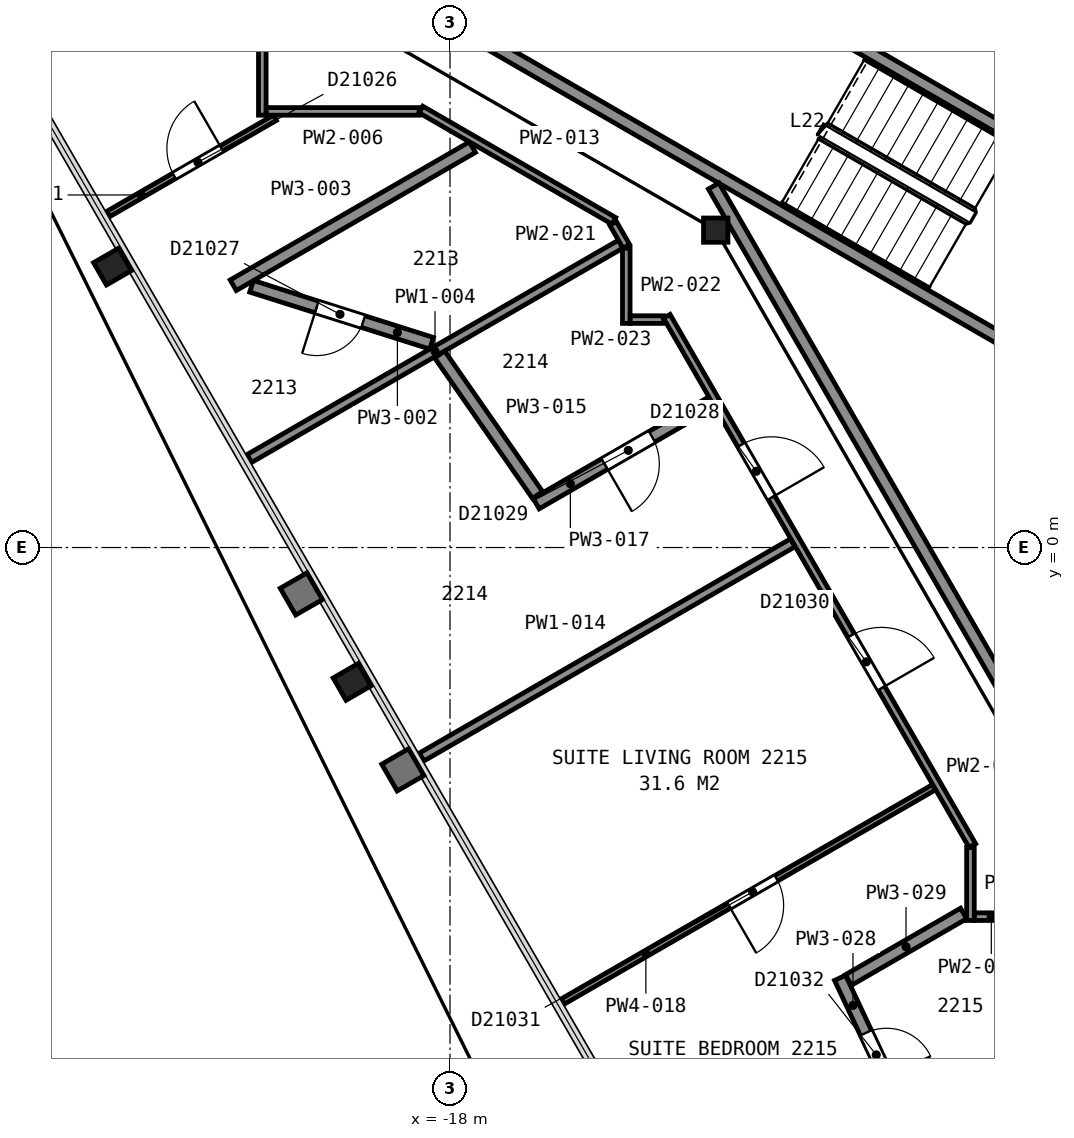
"""IFC4 building model, lengths in metres.
Left out: names, types, materials, properties, quantities, classifications, styles, units other than length and angle.
Written with IfcOpenShell. Run it as: python <this file> out.ifc"""

import sys

from ifc_helpers import new_model, si_unit, direction, frame, frame_2d, origin, origin_2d, place, context, subcontext, project, spatial, rectangle, i_section, extrude, element, fill, save


model = new_model("IFC4")
c1 = context("Model", 3, precision=1e-05, world=origin(), true_north=direction((0.0, 1.0)))
c2 = subcontext(c1, "Body", "Model", "MODEL_VIEW")
j1 = project(units=[si_unit("LENGTHUNIT", "METRE"), si_unit("PLANEANGLEUNIT", "RADIAN")], contexts=[c1])
p1 = place(None, origin())
s1 = spatial("IfcSite", under=j1, at=p1, CompositionType="ELEMENT")
p2 = place(p1, origin())
s2 = spatial("IfcBuilding", under=s1, at=p2, CompositionType="ELEMENT")
p3 = place(p2, frame((0.0, 0.0, 96.4)))
s3 = spatial("IfcBuildingStorey", under=s2, at=p3, CompositionType="ELEMENT", Elevation=96.4)
p4 = place(p3, frame((-23.55, 4.62, 0.0), z_axis=(0.0, 0.0, 1.0), x_axis=(-0.5, 0.866025403784, 0.0)))
e1 = element("IfcColumn", 1, at=p4, inside=s3, PredefinedType="COLUMN", context=c2, shape_type="SweptSolid", body=[
    extrude(i_section(OverallWidth=0.424, OverallDepth=0.475, WebThickness=0.048, FlangeThickness=0.077, FilletRadius=0.015, at=origin_2d()), origin(), (0.0, 0.0, 1.0), 3.555),
])
p5 = place(p3, frame((-19.61, -2.21, 0.0), z_axis=(0.0, 0.0, 1.0), x_axis=(-0.5, 0.866025403784, 0.0)))
e2 = element("IfcColumn", 2, at=p5, inside=s3, PredefinedType="COLUMN", context=c2, shape_type="SweptSolid", body=[
    extrude(i_section(OverallWidth=0.424, OverallDepth=0.475, WebThickness=0.048, FlangeThickness=0.077, FilletRadius=0.015, at=origin_2d()), origin(), (0.0, 0.0, 1.0), 3.56),
])
p6 = place(p3, frame((-13.63, 5.22, 0.0), z_axis=(0.0, 0.0, 1.0), x_axis=(1.0, 0.0, 0.0)))
e3 = element("IfcColumn", 3, at=p6, inside=s3, PredefinedType="COLUMN", context=c2, shape_type="SweptSolid", body=[
    extrude(i_section(OverallWidth=0.401, OverallDepth=0.399, WebThickness=0.025, FlangeThickness=0.04, FilletRadius=0.015, at=origin_2d()), origin(), (0.0, 0.0, 1.0), 3.6),
])
for number, where, z_axis, x_axis in (
    (4, (-7.678, 2.701, 0.0), (0.0, 0.0, 1.0), (-0.866, 0.5, 0.0)),
    (5, (-6.178, 5.299, 0.0), (0.0, 0.0, 1.0), (-0.866, 0.5, 0.0)),
):
    element("IfcWall", number, at=place(p3, frame(where, z_axis=z_axis, x_axis=x_axis)), inside=s3, PredefinedType="PARTITIONING", context=c2, shape_type="SweptSolid", body=[
        extrude(rectangle(XDim=12.0, YDim=0.2, at=frame_2d((6.0, 0.0))), origin(), (0.0, 0.0, 1.0), 3.35),
    ])
p7 = place(p3, frame((-13.664, 5.946, 0.0), z_axis=(0.0, 0.0, 1.0), x_axis=(0.499994327219, -0.866028678941, 0.0)))
e6 = element("IfcWall", 6, at=p7, inside=s3, PredefinedType="PARTITIONING", context=c2, shape_type="SweptSolid", body=[
    extrude(rectangle(XDim=23.968, YDim=0.2, at=frame_2d((11.984, 0.0))), origin(), (0.0, 0.0, 1.0), 3.35),
])
p8 = place(p3, frame((-20.88, 7.067, 0.0), z_axis=(0.0, 0.0, 1.0), x_axis=(-0.866127794624, -0.499822611913, 0.0)))
e7 = element("IfcWall", 7, at=p8, inside=s3, PredefinedType="PARTITIONING", context=c2, shape_type="SweptSolid", body=[
    extrude(rectangle(XDim=3.165, YDim=0.1, at=frame_2d((1.583, 0.0))), origin(), (0.0, 0.0, 1.0), 2.613),
])
p9 = place(p8, frame((1.011, 0.0, 0.0)))
e8 = element("IfcOpeningElement", 8, at=p9, cuts=e7, PredefinedType="OPENING", context=c2, shape_type="SweptSolid", body=[
    extrude(rectangle(XDim=0.9, YDim=2.1, at=frame_2d((0.45, 1.05))), frame((0.0, 0.06, 0.0), z_axis=(0.0, -1.0, 0.0), x_axis=(1.0, 0.0, 0.0)), (0.0, 0.0, 1.0), 0.12),
])
p10 = place(p3, frame((-21.263, 4.296, 0.0), z_axis=(0.0, 0.0, 1.0), x_axis=(0.95341383314, -0.301665481582, 0.0)))
e9 = element("IfcWall", 9, at=p10, inside=s3, PredefinedType="PARTITIONING", context=c2, shape_type="SweptSolid", body=[
    extrude(rectangle(XDim=3.106, YDim=0.2, at=frame_2d((1.553, 0.0))), origin(), (0.0, 0.0, 1.0), 2.613),
])
p11 = place(p10, frame((1.125, 0.0, 0.0)))
e10 = element("IfcOpeningElement", 10, at=p11, cuts=e9, PredefinedType="OPENING", context=c2, shape_type="SweptSolid", body=[
    extrude(rectangle(XDim=0.8, YDim=2.1, at=frame_2d((0.4, 1.05))), frame((0.0, 0.11, 0.0), z_axis=(0.0, -1.0, 0.0), x_axis=(1.0, 0.0, 0.0)), (0.0, 0.0, 1.0), 0.22),
])
p12 = place(p3, frame((-21.565, 4.314, 0.0), z_axis=(0.0, 0.0, 1.0), x_axis=(0.866058501026, 0.499942669514, 0.0)))
e11 = element("IfcWall", 11, at=p12, inside=s3, PredefinedType="PARTITIONING", context=c2, shape_type="SweptSolid", body=[
    extrude(rectangle(XDim=4.542, YDim=0.2, at=frame_2d((2.271, 0.0))), origin(), (0.0, 0.0, 1.0), 2.613),
])
p13 = place(p3, frame((-21.301, 1.464, 0.0), z_axis=(0.0, 0.0, 1.0), x_axis=(0.866055299146, 0.49994821614, 0.0)))
e12 = element("IfcWall", 12, at=p13, inside=s3, PredefinedType="PARTITIONING", context=c2, shape_type="SweptSolid", body=[
    extrude(rectangle(XDim=7.052, YDim=0.15, at=frame_2d((3.526, 0.0))), origin(), (0.0, 0.0, 1.0), 2.613),
])
p14 = place(p3, frame((-21.087, 7.111, 0.0), z_axis=(0.0, 0.0, 1.0), x_axis=(0.0, 1.0, 0.0)))
e13 = element("IfcWall", 13, at=p14, inside=s3, PredefinedType="PARTITIONING", context=c2, shape_type="SweptSolid", body=[
    extrude(rectangle(XDim=3.099, YDim=0.125, at=frame_2d((1.549, 0.0))), origin(), (0.0, 0.0, 1.0), 2.613),
])
p15 = place(p3, frame((-21.022, 7.173, 0.0), z_axis=(0.0, 0.0, 1.0), x_axis=(1.0, 0.0, 0.0)))
e14 = element("IfcWall", 14, at=p15, inside=s3, PredefinedType="PARTITIONING", context=c2, shape_type="SweptSolid", body=[
    extrude(rectangle(XDim=2.513, YDim=0.125, at=frame_2d((1.256, 0.0))), origin(), (0.0, 0.0, 1.0), 2.613),
])
p16 = place(p3, frame((-18.478, 7.204, 0.0), z_axis=(0.0, 0.0, 1.0), x_axis=(0.866011320536, -0.500024392108, 0.0)))
e15 = element("IfcWall", 15, at=p16, inside=s3, PredefinedType="PARTITIONING", context=c2, shape_type="SweptSolid", body=[
    extrude(rectangle(XDim=3.663, YDim=0.125, at=frame_2d((1.832, 0.0))), origin(), (0.0, 0.0, 1.0), 2.613),
])
p17 = place(p3, frame((-18.466, -3.445, 0.0), z_axis=(0.0, 0.0, 1.0), x_axis=(0.86605175433, 0.499954356739, 0.0)))
e16 = element("IfcWall", 16, at=p17, inside=s3, PredefinedType="PARTITIONING", context=c2, shape_type="SweptSolid", body=[
    extrude(rectangle(XDim=7.048, YDim=0.15, at=frame_2d((3.524, 0.0))), origin(), (0.0, 0.0, 1.0), 2.613),
])
p18 = place(p3, frame((-18.17, 3.175, 0.0), z_axis=(0.0, 0.0, 1.0), x_axis=(0.571541682724, -0.820573034476, 0.0)))
e17 = element("IfcWall", 17, at=p18, inside=s3, PredefinedType="PARTITIONING", context=c2, shape_type="SweptSolid", body=[
    extrude(rectangle(XDim=2.818, YDim=0.2, at=frame_2d((1.409, 0.0))), origin(), (0.0, 0.0, 1.0), 2.613),
])
p19 = place(p3, frame((-16.583, 0.723, 0.0), z_axis=(0.0, 0.0, 1.0), x_axis=(0.866001642064, 0.500041154249, 0.0)))
e18 = element("IfcWall", 18, at=p19, inside=s3, PredefinedType="PARTITIONING", context=c2, shape_type="SweptSolid", body=[
    extrude(rectangle(XDim=3.338, YDim=0.2, at=frame_2d((1.669, 0.0))), origin(), (0.0, 0.0, 1.0), 2.613),
])
p20 = place(p19, frame((1.3, 0.0, 0.0)))
e19 = element("IfcOpeningElement", 19, at=p20, cuts=e18, PredefinedType="OPENING", context=c2, shape_type="SweptSolid", body=[
    extrude(rectangle(XDim=0.9, YDim=2.1, at=frame_2d((0.45, 1.05))), frame((0.0, 0.11, 0.0), z_axis=(0.0, -1.0, 0.0), x_axis=(1.0, 0.0, 0.0)), (0.0, 0.0, 1.0), 0.22),
])
p21 = place(p3, frame((-10.037, -3.94, 0.0), z_axis=(0.0, 0.0, 1.0), x_axis=(-0.866063951978, -0.499933226626, 0.0)))
e20 = element("IfcWall", 20, at=p21, inside=s3, PredefinedType="PARTITIONING", context=c2, shape_type="SweptSolid", body=[
    extrude(rectangle(XDim=7.052, YDim=0.1, at=frame_2d((3.526, 0.0))), origin(), (0.0, 0.0, 1.0), 2.613),
])
p22 = place(p21, frame((2.998, 0.0, 0.0)))
e21 = element("IfcOpeningElement", 21, at=p22, cuts=e20, PredefinedType="OPENING", context=c2, shape_type="SweptSolid", body=[
    extrude(rectangle(XDim=0.9, YDim=2.1, at=frame_2d((0.45, 1.05))), frame((0.0, 0.06, 0.0), z_axis=(0.0, -1.0, 0.0), x_axis=(1.0, 0.0, 0.0)), (0.0, 0.0, 1.0), 0.12),
])
p23 = place(p3, frame((-15.318, 5.33, 0.0), z_axis=(0.0, 0.0, 1.0), x_axis=(0.499836277606, -0.86611990832, 0.0)))
e22 = element("IfcWall", 22, at=p23, inside=s3, PredefinedType="PARTITIONING", context=c2, shape_type="SweptSolid", body=[
    extrude(rectangle(XDim=0.433, YDim=0.125, at=frame_2d((0.217, 0.0))), origin(), (0.0, 0.0, 1.0), 2.613),
])
p24 = place(p3, frame((-15.101, 3.687, 0.0), z_axis=(0.0, 0.0, 1.0), x_axis=(0.0, 1.0, 0.0)))
e23 = element("IfcWall", 23, at=p24, inside=s3, PredefinedType="PARTITIONING", context=c2, shape_type="SweptSolid", body=[
    extrude(rectangle(XDim=1.236, YDim=0.125, at=frame_2d((0.618, 0.0))), origin(), (0.0, 0.0, 1.0), 2.613),
])
p25 = place(p3, frame((-15.036, 3.749, 0.0), z_axis=(0.0, 0.0, 1.0), x_axis=(1.0, 0.0, 0.0)))
e24 = element("IfcWall", 24, at=p25, inside=s3, PredefinedType="PARTITIONING", context=c2, shape_type="SweptSolid", body=[
    extrude(rectangle(XDim=0.547, YDim=0.125, at=frame_2d((0.273, 0.0))), origin(), (0.0, 0.0, 1.0), 2.613),
])
p26 = place(p3, frame((-9.41, -4.902, 0.0), z_axis=(0.0, 0.0, 1.0), x_axis=(-0.499971244726, 0.866042005013, 0.0)))
e25 = element("IfcWall", 25, at=p26, inside=s3, PredefinedType="PARTITIONING", context=c2, shape_type="SweptSolid", body=[
    extrude(rectangle(XDim=10.052, YDim=0.125, at=frame_2d((5.026, 0.0))), origin(), (0.0, 0.0, 1.0), 2.613),
])
p27 = place(p26, frame((6.608, 0.0, 0.0)))
e26 = element("IfcOpeningElement", 26, at=p27, cuts=e25, PredefinedType="OPENING", context=c2, shape_type="SweptSolid", body=[
    extrude(rectangle(XDim=1.0, YDim=2.1, at=frame_2d((0.5, 1.05))), frame((0.0, 0.073, 0.0), z_axis=(0.0, -1.0, 0.0), x_axis=(1.0, 0.0, 0.0)), (0.0, 0.0, 1.0), 0.145),
])
p28 = place(p26, frame((2.989, 0.0, 0.0)))
e27 = element("IfcOpeningElement", 27, at=p28, cuts=e25, PredefinedType="OPENING", context=c2, shape_type="SweptSolid", body=[
    extrude(rectangle(XDim=1.0, YDim=2.1, at=frame_2d((0.5, 1.05))), frame((0.0, 0.073, 0.0), z_axis=(0.0, -1.0, 0.0), x_axis=(1.0, 0.0, 0.0)), (0.0, 0.0, 1.0), 0.145),
])
p29 = place(p3, frame((-13.823, -11.487, 0.0), z_axis=(0.0, 0.0, 1.0), x_axis=(0.865980767462, 0.500077304409, 0.0)))
e28 = element("IfcWall", 28, at=p29, inside=s3, PredefinedType="PARTITIONING", context=c2, shape_type="SweptSolid", body=[
    extrude(rectangle(XDim=7.047, YDim=0.15, at=frame_2d((3.524, 0.0))), origin(), (0.0, 0.0, 1.0), 2.613),
])
p30 = place(p3, frame((-11.585, -7.077, 0.0), z_axis=(0.0, 0.0, 1.0), x_axis=(0.425434257814, -0.904989332688, 0.0)))
e29 = element("IfcWall", 29, at=p30, inside=s3, PredefinedType="PARTITIONING", context=c2, shape_type="SweptSolid", body=[
    extrude(rectangle(XDim=2.625, YDim=0.2, at=frame_2d((1.313, 0.0))), origin(), (0.0, 0.0, 1.0), 2.613),
])
p31 = place(p30, frame((1.0, 0.0, 0.0)))
e30 = element("IfcOpeningElement", 30, at=p31, cuts=e29, PredefinedType="OPENING", context=c2, shape_type="SweptSolid", body=[
    extrude(rectangle(XDim=0.8, YDim=2.1, at=frame_2d((0.4, 1.05))), frame((0.0, 0.11, 0.0), z_axis=(0.0, -1.0, 0.0), x_axis=(1.0, 0.0, 0.0)), (0.0, 0.0, 1.0), 0.22),
])
p32 = place(p3, frame((-11.448, -7.113, 0.0), z_axis=(0.0, 0.0, 1.0), x_axis=(0.865960673566, 0.500112099272, 0.0)))
e31 = element("IfcWall", 31, at=p32, inside=s3, PredefinedType="PARTITIONING", context=c2, shape_type="SweptSolid", body=[
    extrude(rectangle(XDim=2.188, YDim=0.2, at=frame_2d((1.094, 0.0))), origin(), (0.0, 0.0, 1.0), 2.613),
])
p33 = place(p3, frame((-9.441, -6.134, 0.0), z_axis=(0.0, 0.0, 1.0), x_axis=(0.0, 1.0, 0.0)))
e32 = element("IfcWall", 32, at=p33, inside=s3, PredefinedType="PARTITIONING", context=c2, shape_type="SweptSolid", body=[
    extrude(rectangle(XDim=1.2, YDim=0.125, at=frame_2d((0.6, 0.0))), origin(), (0.0, 0.0, 1.0), 2.613),
])
p34 = place(p3, frame((-9.376, -6.071, 0.0), z_axis=(0.0, 0.0, 1.0), x_axis=(1.0, 0.0, 0.0)))
e33 = element("IfcWall", 33, at=p34, inside=s3, PredefinedType="PARTITIONING", context=c2, shape_type="SweptSolid", body=[
    extrude(rectangle(XDim=0.556, YDim=0.125, at=frame_2d((0.278, 0.0))), origin(), (0.0, 0.0, 1.0), 2.613),
])
p35 = place(p9, origin())
e34 = element("IfcDoor", 34, at=p35, inside=s3, OperationType="SINGLE_SWING_LEFT", PredefinedType="DOOR", context=c2, shape_type="SweptSolid", body=[
    extrude(rectangle(XDim=0.9, YDim=2.1, at=frame_2d((0.45, 1.05))), frame((0.0, 0.025, 0.0), z_axis=(0.0, -1.0, 0.0), x_axis=(1.0, 0.0, 0.0)), (0.0, 0.0, 1.0), 0.05),
])
fill(e8, e34)
p36 = place(p11, origin())
e35 = element("IfcDoor", 35, at=p36, inside=s3, OperationType="SINGLE_SWING_LEFT", PredefinedType="DOOR", context=c2, shape_type="SweptSolid", body=[
    extrude(rectangle(XDim=0.8, YDim=2.1, at=frame_2d((0.4, 1.05))), frame((0.0, 0.025, 0.0), z_axis=(0.0, -1.0, 0.0), x_axis=(1.0, 0.0, 0.0)), (0.0, 0.0, 1.0), 0.05),
])
fill(e10, e35)
p37 = place(p20, origin())
e36 = element("IfcDoor", 36, at=p37, inside=s3, OperationType="SINGLE_SWING_LEFT", PredefinedType="DOOR", context=c2, shape_type="SweptSolid", body=[
    extrude(rectangle(XDim=0.9, YDim=2.1, at=frame_2d((0.45, 1.05))), frame((0.0, 0.025, 0.0), z_axis=(0.0, -1.0, 0.0), x_axis=(1.0, 0.0, 0.0)), (0.0, 0.0, 1.0), 0.05),
])
fill(e19, e36)
p38 = place(p22, origin())
e37 = element("IfcDoor", 37, at=p38, inside=s3, OperationType="SINGLE_SWING_RIGHT", PredefinedType="DOOR", context=c2, shape_type="SweptSolid", body=[
    extrude(rectangle(XDim=0.9, YDim=2.1, at=frame_2d((0.45, 1.05))), frame((0.0, 0.025, 0.0), z_axis=(0.0, -1.0, 0.0), x_axis=(1.0, 0.0, 0.0)), (0.0, 0.0, 1.0), 0.05),
])
fill(e21, e37)
p39 = place(p27, origin())
e38 = element("IfcDoor", 38, at=p39, inside=s3, OperationType="SINGLE_SWING_LEFT", PredefinedType="DOOR", context=c2, shape_type="SweptSolid", body=[
    extrude(rectangle(XDim=1.0, YDim=2.1, at=frame_2d((0.5, 1.05))), frame((0.0, 0.025, 0.0), z_axis=(0.0, -1.0, 0.0), x_axis=(1.0, 0.0, 0.0)), (0.0, 0.0, 1.0), 0.05),
])
fill(e26, e38)
p40 = place(p28, origin())
e39 = element("IfcDoor", 39, at=p40, inside=s3, OperationType="SINGLE_SWING_LEFT", PredefinedType="DOOR", context=c2, shape_type="SweptSolid", body=[
    extrude(rectangle(XDim=1.0, YDim=2.1, at=frame_2d((0.5, 1.05))), frame((0.0, 0.025, 0.0), z_axis=(0.0, -1.0, 0.0), x_axis=(1.0, 0.0, 0.0)), (0.0, 0.0, 1.0), 0.05),
])
fill(e27, e39)
p41 = place(p31, origin())
e40 = element("IfcDoor", 40, at=p41, inside=s3, OperationType="SINGLE_SWING_RIGHT", PredefinedType="DOOR", context=c2, shape_type="SweptSolid", body=[
    extrude(rectangle(XDim=0.8, YDim=2.1, at=frame_2d((0.4, 1.05))), frame((0.0, 0.025, 0.0), z_axis=(0.0, -1.0, 0.0), x_axis=(1.0, 0.0, 0.0)), (0.0, 0.0, 1.0), 0.05),
])
fill(e30, e40)
save(model, sys.argv[1])
